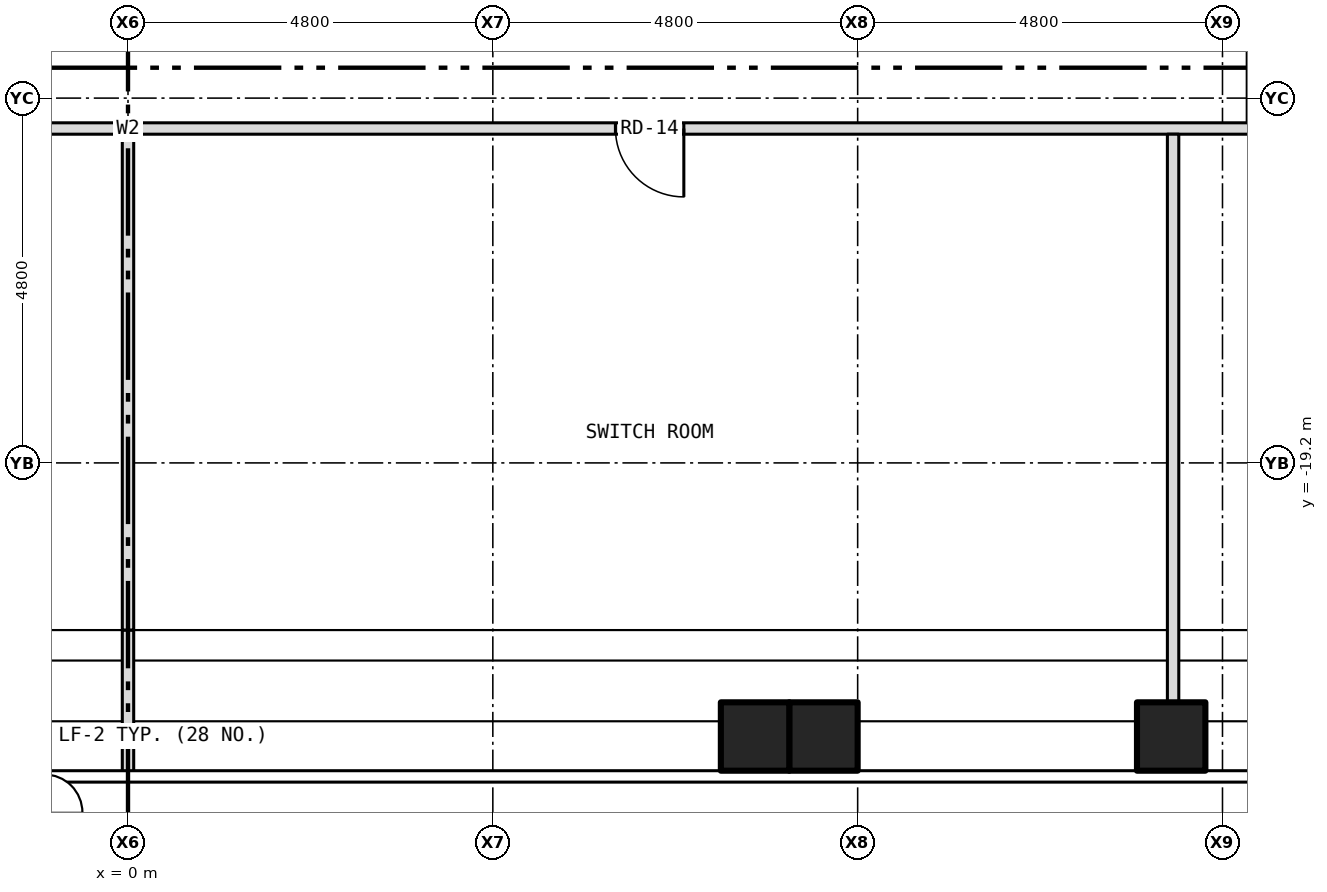
"""IFC4 building model, lengths in metres.
Left out: names, types, materials, properties, quantities, classifications, styles, units other than length and angle.
Written with IfcOpenShell. Run it as: python <this file> out.ifc"""

import sys

from ifc_helpers import new_model, si_unit, direction, frame, frame_2d, origin, origin_2d, place, context, subcontext, project, spatial, rectangle, hollow_rectangle, extrude, element, fill, save


model = new_model("IFC4")
c1 = context("Model", 3, precision=1e-05, world=origin(), true_north=direction((0.0, 1.0)))
c2 = subcontext(c1, "Body", "Model", "MODEL_VIEW")
j1 = project(units=[si_unit("LENGTHUNIT", "METRE"), si_unit("PLANEANGLEUNIT", "RADIAN")], contexts=[c1])
p1 = place(None, origin())
s1 = spatial("IfcSite", under=j1, at=p1, CompositionType="ELEMENT")
p2 = place(p1, origin())
s2 = spatial("IfcBuilding", under=s1, at=p2, CompositionType="ELEMENT")
p3 = place(p2, frame((0.0, 0.0, 138.0)))
s3 = spatial("IfcBuildingStorey", under=s2, at=p3, CompositionType="ELEMENT", Elevation=138.0)
for number, where, z_axis, x_axis in (
    (1, (9.15, -22.8, -0.3), (0.0, 0.0, 1.0), (1.0, 0.0, 0.0)),
    (2, (13.725, -22.8, -0.3), (0.0, 0.0, 1.0), (1.0, 0.0, 0.0)),
    (3, (8.25, -22.8, -0.3), (0.0, 0.0, 1.0), (1.0, 0.0, 0.0)),
):
    element("IfcColumn", number, at=place(p3, frame(where, z_axis=z_axis, x_axis=x_axis)), inside=s3, PredefinedType="COLUMN", context=c2, shape_type="SweptSolid", body=[
        extrude(hollow_rectangle(XDim=0.9, YDim=0.9, WallThickness=0.05, at=origin_2d()), origin(), (0.0, 0.0, 1.0), 4.6),
    ])
p4 = place(p3, frame((-14.8, -14.8, 0.0), z_axis=(0.0, 0.0, 1.0), x_axis=(1.0, 0.0, 0.0)))
e4 = element("IfcWall", 4, at=p4, inside=s3, PredefinedType="PARTITIONING", context=c2, shape_type="SweptSolid", body=[
    extrude(rectangle(XDim=29.6, YDim=0.15, at=frame_2d((14.8, 0.0))), origin(), (0.0, 0.0, 1.0), 4.3),
])
p5 = place(p4, frame((7.488, 0.0, 0.0)))
e5 = element("IfcOpeningElement", 5, at=p5, cuts=e4, PredefinedType="OPENING", context=c2, shape_type="SweptSolid", body=[
    extrude(rectangle(XDim=0.9, YDim=2.1, at=frame_2d((0.45, 1.05))), frame((0.0, 0.087, 0.0), z_axis=(0.0, -1.0, 0.0), x_axis=(1.0, 0.0, 0.0)), (0.0, 0.0, 1.0), 0.174),
])
p6 = place(p4, frame((21.213, 0.0, 0.0)))
e6 = element("IfcOpeningElement", 6, at=p6, cuts=e4, PredefinedType="OPENING", context=c2, shape_type="SweptSolid", body=[
    extrude(rectangle(XDim=0.9, YDim=2.1, at=frame_2d((0.45, 1.05))), frame((0.0, 0.087, 0.0), z_axis=(0.0, -1.0, 0.0), x_axis=(1.0, 0.0, 0.0)), (0.0, 0.0, 1.0), 0.174),
])
p7 = place(p3, frame((0.0, -23.28, 0.0), z_axis=(0.0, 0.0, 1.0), x_axis=(0.0, 1.0, 0.0)))
e7 = element("IfcWall", 7, at=p7, inside=s3, PredefinedType="PARTITIONING", context=c2, shape_type="SweptSolid", body=[
    extrude(rectangle(XDim=1.881, YDim=0.15, at=frame_2d((0.94, 0.0))), origin(), (0.0, 0.0, 1.0), 4.3),
])
p8 = place(p3, frame((0.0, -21.399, 0.0), z_axis=(0.0, 0.0, 1.0), x_axis=(0.0, 1.0, 0.0)))
e8 = element("IfcWall", 8, at=p8, inside=s3, PredefinedType="PARTITIONING", context=c2, shape_type="SweptSolid", body=[
    extrude(rectangle(XDim=6.524, YDim=0.15, at=frame_2d((3.262, 0.0))), origin(), (0.0, 0.0, 1.0), 3.678),
])
p9 = place(p3, frame((13.75, -22.68, 0.0), z_axis=(0.0, 0.0, 1.0), x_axis=(0.0, 1.0, 0.0)))
e9 = element("IfcWall", 9, at=p9, inside=s3, PredefinedType="PARTITIONING", context=c2, shape_type="SweptSolid", body=[
    extrude(rectangle(XDim=7.805, YDim=0.15, at=frame_2d((3.902, 0.0))), origin(), (0.0, 0.0, 1.0), 4.3),
])
p10 = place(p6, origin())
e10 = element("IfcDoor", 10, at=p10, inside=s3, OperationType="SINGLE_SWING_RIGHT", PredefinedType="DOOR", context=c2, shape_type="SweptSolid", body=[
    extrude(rectangle(XDim=0.9, YDim=2.1, at=frame_2d((0.45, 1.05))), frame((0.0, 0.025, 0.0), z_axis=(0.0, -1.0, 0.0), x_axis=(1.0, 0.0, 0.0)), (0.0, 0.0, 1.0), 0.05),
])
fill(e6, e10)
save(model, sys.argv[1])
